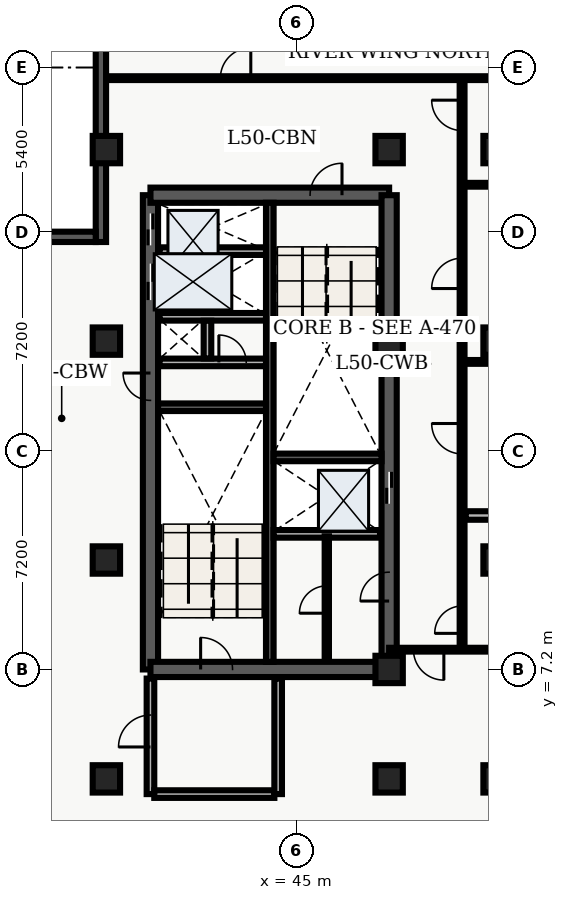
"""IFC4 building model, lengths in metres.
Left out: names, types, materials, properties, quantities, classifications, styles, units other than length and angle.
Written with IfcOpenShell. Run it as: python <this file> out.ifc"""

import sys

from ifc_helpers import new_model, entity, si_unit, converted_unit, direction, frame, origin_with_axes, origin_2d_with_axis, place, context, subcontext, project, spatial, polyline, rectangle, outline, extrude, element, fill, save


model = new_model("IFC4")
c1 = context("Model", 3, precision=1e-05, world=origin_with_axes(), true_north=direction((0.0, 1.0)))
c2 = subcontext(c1, "Body", "Model", "MODEL_VIEW")
j1 = project(units=[si_unit("LENGTHUNIT", "METRE"), converted_unit("PLANEANGLEUNIT", "DEGREE", entity("IfcPlaneAngleMeasure", 0.017), si_unit("PLANEANGLEUNIT", "RADIAN"), dimensions=[0, 0, 0, 0, 0, 0, 0])], contexts=[c1])
p1 = place(None, origin_with_axes())
s1 = spatial("IfcSite", under=j1, at=p1, CompositionType="ELEMENT")
p2 = place(p1, origin_with_axes())
s2 = spatial("IfcBuilding", under=s1, at=p2, CompositionType="ELEMENT")
p3 = place(p2, frame((0.0, 0.0, 204.3), z_axis=(0.0, 0.0, 1.0), x_axis=(1.0, 0.0, 0.0)))
s3 = spatial("IfcBuildingStorey", under=s2, at=p3, CompositionType="ELEMENT", Elevation=204.3)
p4 = place(p3, frame((40.2, 7.2, 0.0), z_axis=(0.0, 0.0, 1.0), x_axis=(0.0, 1.0, 0.0)))
e1 = element("IfcWall", 1, at=p4, inside=s3, PredefinedType="SHEAR", context=c2, shape_type="SweptSolid", body=[
    extrude(outline(polyline([(0.0, -0.25), (15.6, -0.25), (15.6, 0.25), (0.0, 0.25), (0.0, -0.25)])), origin_with_axes(), (0.0, 0.0, 1.0), 3.66),
])
p5 = place(p4, frame((14.475, 0.0, 0.0), z_axis=(0.0, 0.0, 1.0), x_axis=(1.0, 0.0, 0.0)))
e2 = element("IfcOpeningElement", 2, at=p5, cuts=e1, PredefinedType="OPENING", context=c2, shape_type="SweptSolid", body=[
    extrude(rectangle(XDim=1.05, YDim=0.52, at=origin_2d_with_axis()), origin_with_axes(), (0.0, 0.0, 1.0), 2.15),
])
p6 = place(p4, frame((12.75, 0.0, 0.0), z_axis=(0.0, 0.0, 1.0), x_axis=(1.0, 0.0, 0.0)))
e3 = element("IfcOpeningElement", 3, at=p6, cuts=e1, PredefinedType="OPENING", context=c2, shape_type="SweptSolid", body=[
    extrude(rectangle(XDim=1.2, YDim=0.52, at=origin_2d_with_axis()), origin_with_axes(), (0.0, 0.0, 1.0), 2.15),
])
p7 = place(p4, frame((9.3, 0.0, 0.0), z_axis=(0.0, 0.0, 1.0), x_axis=(1.0, 0.0, 0.0)))
e4 = element("IfcOpeningElement", 4, at=p7, cuts=e1, PredefinedType="OPENING", context=c2, shape_type="SweptSolid", body=[
    extrude(rectangle(XDim=0.9, YDim=0.52, at=origin_2d_with_axis()), origin_with_axes(), (0.0, 0.0, 1.0), 2.15),
])
p8 = place(p3, frame((40.2, 7.2, 0.0), z_axis=(0.0, 0.0, 1.0), x_axis=(1.0, 0.0, 0.0)))
e5 = element("IfcWall", 5, at=p8, inside=s3, PredefinedType="SHEAR", context=c2, shape_type="SweptSolid", body=[
    extrude(outline(polyline([(0.0, -0.25), (7.85, -0.25), (7.85, 0.25), (0.0, 0.25), (0.0, -0.25)])), origin_with_axes(), (0.0, 0.0, 1.0), 3.66),
])
p9 = place(p8, frame((2.175, 0.0, 0.0), z_axis=(0.0, 0.0, 1.0), x_axis=(1.0, 0.0, 0.0)))
e6 = element("IfcOpeningElement", 6, at=p9, cuts=e5, PredefinedType="OPENING", context=c2, shape_type="SweptSolid", body=[
    extrude(rectangle(XDim=1.05, YDim=0.52, at=origin_2d_with_axis()), origin_with_axes(), (0.0, 0.0, 1.0), 2.15),
])
p10 = place(p3, frame((40.2, 22.8, 0.0), z_axis=(0.0, 0.0, 1.0), x_axis=(1.0, 0.0, 0.0)))
e7 = element("IfcWall", 7, at=p10, inside=s3, PredefinedType="SHEAR", context=c2, shape_type="SweptSolid", body=[
    extrude(outline(polyline([(0.0, -0.25), (7.85, -0.25), (7.85, 0.25), (0.0, 0.25), (0.0, -0.25)])), origin_with_axes(), (0.0, 0.0, 1.0), 3.66),
])
p11 = place(p10, frame((5.775, 0.0, 0.0), z_axis=(0.0, 0.0, 1.0), x_axis=(1.0, 0.0, 0.0)))
e8 = element("IfcOpeningElement", 8, at=p11, cuts=e7, PredefinedType="OPENING", context=c2, shape_type="SweptSolid", body=[
    extrude(rectangle(XDim=1.05, YDim=0.52, at=origin_2d_with_axis()), origin_with_axes(), (0.0, 0.0, 1.0), 2.15),
])
p12 = place(p3, frame((48.05, 7.2, 0.0), z_axis=(0.0, 0.0, 1.0), x_axis=(0.0, 1.0, 0.0)))
e9 = element("IfcWall", 9, at=p12, inside=s3, PredefinedType="SHEAR", context=c2, shape_type="SweptSolid", body=[
    extrude(outline(polyline([(0.0, -0.25), (15.6, -0.25), (15.6, 0.25), (0.0, 0.25), (0.0, -0.25)])), origin_with_axes(), (0.0, 0.0, 1.0), 3.66),
])
p13 = place(p12, frame((5.975, 0.0, 0.0), z_axis=(0.0, 0.0, 1.0), x_axis=(1.0, 0.0, 0.0)))
e10 = element("IfcOpeningElement", 10, at=p13, cuts=e9, PredefinedType="OPENING", context=c2, shape_type="SweptSolid", body=[
    extrude(rectangle(XDim=1.05, YDim=0.52, at=origin_2d_with_axis()), origin_with_axes(), (0.0, 0.0, 1.0), 2.15),
])
p14 = place(p12, frame((2.725, 0.0, 0.0), z_axis=(0.0, 0.0, 1.0), x_axis=(1.0, 0.0, 0.0)))
e11 = element("IfcOpeningElement", 11, at=p14, cuts=e9, PredefinedType="OPENING", context=c2, shape_type="SweptSolid", body=[
    extrude(rectangle(XDim=0.95, YDim=0.52, at=origin_2d_with_axis()), origin_with_axes(), (0.0, 0.0, 1.0), 2.15),
])
p15 = place(p3, frame((44.125, 7.45, 0.0), z_axis=(0.0, 0.0, 1.0), x_axis=(0.0, 1.0, 0.0)))
e12 = element("IfcWall", 12, at=p15, inside=s3, PredefinedType="SHEAR", context=c2, shape_type="SweptSolid", body=[
    extrude(outline(polyline([(0.0, -0.125), (15.1, -0.125), (15.1, 0.125), (0.0, 0.125), (0.0, -0.125)])), origin_with_axes(), (0.0, 0.0, 1.0), 3.66),
])
for number, where, z_axis, x_axis in (
    (13, (40.45, 15.825, 0.0), (0.0, 0.0, 1.0), (1.0, 0.0, 0.0)),
    (14, (44.25, 14.175, 0.0), (0.0, 0.0, 1.0), (1.0, 0.0, 0.0)),
):
    element("IfcWall", number, at=place(p3, frame(where, z_axis=z_axis, x_axis=x_axis)), inside=s3, PredefinedType="SHEAR", context=c2, shape_type="SweptSolid", body=[
        extrude(outline(polyline([(0.0, -0.125), (3.55, -0.125), (3.55, 0.125), (0.0, 0.125), (0.0, -0.125)])), origin_with_axes(), (0.0, 0.0, 1.0), 3.66),
    ])
p16 = place(p3, frame((40.5, 17.3, 0.0), z_axis=(0.0, 0.0, 1.0), x_axis=(1.0, 0.0, 0.0)))
e15 = element("IfcWall", 15, at=p16, inside=s3, PredefinedType="SOLIDWALL", context=c2, shape_type="SweptSolid", body=[
    extrude(outline(polyline([(0.0, -0.125), (3.5, -0.125), (3.5, 0.125), (0.0, 0.125), (0.0, -0.125)])), origin_with_axes(), (0.0, 0.0, 1.0), 2.7),
])
p17 = place(p16, frame((2.4, 0.0, 0.0), z_axis=(0.0, 0.0, 1.0), x_axis=(1.0, 0.0, 0.0)))
e16 = element("IfcOpeningElement", 16, at=p17, cuts=e15, PredefinedType="OPENING", context=c2, shape_type="SweptSolid", body=[
    extrude(rectangle(XDim=0.9, YDim=0.27, at=origin_2d_with_axis()), origin_with_axes(), (0.0, 0.0, 1.0), 2.15),
])
p18 = place(p3, frame((40.5, 18.8, 0.0), z_axis=(0.0, 0.0, 1.0), x_axis=(1.0, 0.0, 0.0)))
e17 = element("IfcWall", 17, at=p18, inside=s3, PredefinedType="SOLIDWALL", context=c2, shape_type="SweptSolid", body=[
    extrude(outline(polyline([(0.0, -0.125), (3.5, -0.125), (3.5, 0.125), (0.0, 0.125), (0.0, -0.125)])), origin_with_axes(), (0.0, 0.0, 1.0), 2.7),
])
p19 = place(p3, frame((42.075, 17.43, 0.0), z_axis=(0.0, 0.0, 1.0), x_axis=(0.0, 1.0, 0.0)))
e18 = element("IfcWall", 18, at=p19, inside=s3, PredefinedType="SOLIDWALL", context=c2, shape_type="SweptSolid", body=[
    extrude(outline(polyline([(0.0, -0.125), (1.24, -0.125), (1.24, 0.125), (0.0, 0.125), (0.0, -0.125)])), origin_with_axes(), (0.0, 0.0, 1.0), 2.7),
])
p20 = place(p3, frame((40.2, 3.1, 0.0), z_axis=(0.0, 0.0, 1.0), x_axis=(0.0, 1.0, 0.0)))
e19 = element("IfcWall", 19, at=p20, inside=s3, PredefinedType="SOLIDWALL", context=c2, shape_type="SweptSolid", body=[
    extrude(outline(polyline([(0.0, -0.125), (3.8, -0.125), (3.8, 0.125), (0.0, 0.125), (0.0, -0.125)])), origin_with_axes(), (0.0, 0.0, 1.0), 2.7),
])
p21 = place(p20, frame((2.075, 0.0, 0.0), z_axis=(0.0, 0.0, 1.0), x_axis=(1.0, 0.0, 0.0)))
e20 = element("IfcOpeningElement", 20, at=p21, cuts=e19, PredefinedType="OPENING", context=c2, shape_type="SweptSolid", body=[
    extrude(rectangle(XDim=1.05, YDim=0.27, at=origin_2d_with_axis()), origin_with_axes(), (0.0, 0.0, 1.0), 2.15),
])
p22 = place(p3, frame((40.325, 3.1, 0.0), z_axis=(0.0, 0.0, 1.0), x_axis=(1.0, 0.0, 0.0)))
e21 = element("IfcWall", 21, at=p22, inside=s3, PredefinedType="SOLIDWALL", context=c2, shape_type="SweptSolid", body=[
    extrude(outline(polyline([(0.0, -0.125), (3.95, -0.125), (3.95, 0.125), (0.0, 0.125), (0.0, -0.125)])), origin_with_axes(), (0.0, 0.0, 1.0), 2.7),
])
p23 = place(p3, frame((44.4, 3.1, 0.0), z_axis=(0.0, 0.0, 1.0), x_axis=(0.0, 1.0, 0.0)))
e22 = element("IfcWall", 22, at=p23, inside=s3, PredefinedType="SOLIDWALL", context=c2, shape_type="SweptSolid", body=[
    extrude(outline(polyline([(0.0, -0.125), (3.8, -0.125), (3.8, 0.125), (0.0, 0.125), (0.0, -0.125)])), origin_with_axes(), (0.0, 0.0, 1.0), 2.7),
])
for number, where, z_axis, x_axis in (
    (23, (38.75, 3.6, 0.0), (0.0, 0.0, 1.0), (1.0, 0.0, 0.0)),
    (24, (38.75, 10.8, 0.0), (0.0, 0.0, 1.0), (1.0, 0.0, 0.0)),
    (25, (38.75, 18.0, 0.0), (0.0, 0.0, 1.0), (1.0, 0.0, 0.0)),
    (26, (38.75, 24.3, 0.0), (0.0, 0.0, 1.0), (1.0, 0.0, 0.0)),
    (27, (48.05, 3.6, 0.0), (0.0, 0.0, 1.0), (1.0, 0.0, 0.0)),
    (28, (48.05, 7.2, 0.0), (0.0, 0.0, 1.0), (1.0, 0.0, 0.0)),
    (29, (48.05, 18.0, 0.0), (0.0, 0.0, 1.0), (1.0, 0.0, 0.0)),
    (30, (48.05, 24.3, 0.0), (0.0, 0.0, 1.0), (1.0, 0.0, 0.0)),
    (31, (51.6, 3.6, 0.0), (0.0, 0.0, 1.0), (1.0, 0.0, 0.0)),
    (32, (51.6, 10.8, 0.0), (0.0, 0.0, 1.0), (1.0, 0.0, 0.0)),
    (33, (51.6, 18.0, 0.0), (0.0, 0.0, 1.0), (1.0, 0.0, 0.0)),
    (34, (51.6, 24.3, 0.0), (0.0, 0.0, 1.0), (1.0, 0.0, 0.0)),
):
    element("IfcColumn", number, at=place(p3, frame(where, z_axis=z_axis, x_axis=x_axis)), inside=s3, PredefinedType="COLUMN", context=c2, shape_type="SweptSolid", body=[
        extrude(rectangle(XDim=0.9, YDim=0.9, at=origin_2d_with_axis()), origin_with_axes(), (0.0, 0.0, 1.0), 3.9),
    ])
for number, where, z_axis, x_axis in (
    (35, (40.5, 20.96, 0.0), (0.0, 0.0, 1.0), (1.0, 0.0, 0.0)),
    (36, (44.25, 11.66, 0.0), (0.0, 0.0, 1.0), (1.0, 0.0, 0.0)),
):
    element("IfcWall", number, at=place(p3, frame(where, z_axis=z_axis, x_axis=x_axis)), inside=s3, PredefinedType="SOLIDWALL", context=c2, shape_type="SweptSolid", body=[
        extrude(outline(polyline([(0.0, -0.125), (3.5, -0.125), (3.5, 0.125), (0.0, 0.125), (0.0, -0.125)])), origin_with_axes(), (0.0, 0.0, 1.0), 2.7),
    ])
p24 = place(p3, frame((46.0, 7.5, 0.0), z_axis=(0.0, 0.0, 1.0), x_axis=(0.0, 1.0, 0.0)))
e37 = element("IfcWall", 37, at=p24, inside=s3, PredefinedType="PARTITIONING", context=c2, shape_type="SweptSolid", body=[
    extrude(outline(polyline([(0.0, -0.07), (4.08, -0.07), (4.08, 0.07), (0.0, 0.07), (0.0, -0.07)])), origin_with_axes(), (0.0, 0.0, 1.0), 2.7),
])
p25 = place(p24, frame((2.0, 0.0, 0.0), z_axis=(0.0, 0.0, 1.0), x_axis=(1.0, 0.0, 0.0)))
e38 = element("IfcOpeningElement", 38, at=p25, cuts=e37, PredefinedType="OPENING", context=c2, shape_type="SweptSolid", body=[
    extrude(rectangle(XDim=0.9, YDim=0.16, at=origin_2d_with_axis()), origin_with_axes(), (0.0, 0.0, 1.0), 2.15),
])
p26 = place(p3, frame((50.45, 7.85, 0.0), z_axis=(0.0, 0.0, 1.0), x_axis=(0.0, 1.0, 0.0)))
e39 = element("IfcWall", 39, at=p26, inside=s3, PredefinedType="PARTITIONING", context=c2, shape_type="SweptSolid", body=[
    extrude(outline(polyline([(0.0, -0.08), (18.8, -0.08), (18.8, 0.08), (0.0, 0.08), (0.0, -0.08)])), origin_with_axes(), (0.0, 0.0, 1.0), 2.7),
])
p27 = place(p26, frame((0.987, 0.0, 0.0), z_axis=(0.0, 0.0, 1.0), x_axis=(1.0, 0.0, 0.0)))
e40 = element("IfcOpeningElement", 40, at=p27, cuts=e39, PredefinedType="OPENING", context=c2, shape_type="SweptSolid", body=[
    extrude(rectangle(XDim=0.9, YDim=0.18, at=origin_2d_with_axis()), origin_with_axes(), (0.0, 0.0, 1.0), 2.15),
])
p28 = place(p26, frame((6.94, 0.0, 0.0), z_axis=(0.0, 0.0, 1.0), x_axis=(1.0, 0.0, 0.0)))
e41 = element("IfcOpeningElement", 41, at=p28, cuts=e39, PredefinedType="OPENING", context=c2, shape_type="SweptSolid", body=[
    extrude(rectangle(XDim=1.0, YDim=0.18, at=origin_2d_with_axis()), origin_with_axes(), (0.0, 0.0, 1.0), 2.15),
])
p29 = place(p26, frame((12.38, 0.0, 0.0), z_axis=(0.0, 0.0, 1.0), x_axis=(1.0, 0.0, 0.0)))
e42 = element("IfcOpeningElement", 42, at=p29, cuts=e39, PredefinedType="OPENING", context=c2, shape_type="SweptSolid", body=[
    extrude(rectangle(XDim=1.0, YDim=0.18, at=origin_2d_with_axis()), origin_with_axes(), (0.0, 0.0, 1.0), 2.15),
])
p30 = place(p26, frame((17.576, 0.0, 0.0), z_axis=(0.0, 0.0, 1.0), x_axis=(1.0, 0.0, 0.0)))
e43 = element("IfcOpeningElement", 43, at=p30, cuts=e39, PredefinedType="OPENING", context=c2, shape_type="SweptSolid", body=[
    extrude(rectangle(XDim=1.0, YDim=0.18, at=origin_2d_with_axis()), origin_with_axes(), (0.0, 0.0, 1.0), 2.15),
])
p31 = place(p3, frame((59.665, 7.85, 0.0), z_axis=(0.0, 0.0, 1.0), x_axis=(-1.0, 0.0, 0.0)))
e44 = element("IfcWall", 44, at=p31, inside=s3, PredefinedType="PARTITIONING", context=c2, shape_type="SweptSolid", body=[
    extrude(outline(polyline([(0.0, -0.062), (11.615, -0.062), (11.615, 0.062), (0.0, 0.062), (0.0, -0.062)])), origin_with_axes(), (0.0, 0.0, 1.0), 2.7),
])
p32 = place(p31, frame((10.315, 0.0, 0.0), z_axis=(0.0, 0.0, 1.0), x_axis=(1.0, 0.0, 0.0)))
e45 = element("IfcOpeningElement", 45, at=p32, cuts=e44, PredefinedType="OPENING", context=c2, shape_type="SweptSolid", body=[
    extrude(rectangle(XDim=1.0, YDim=0.145, at=origin_2d_with_axis()), origin_with_axes(), (0.0, 0.0, 1.0), 2.15),
])
p33 = place(p3, frame((38.735, 26.65, 0.0), z_axis=(0.0, 0.0, 1.0), x_axis=(1.0, 0.0, 0.0)))
e46 = element("IfcWall", 46, at=p33, inside=s3, PredefinedType="PARTITIONING", context=c2, shape_type="SweptSolid", body=[
    extrude(outline(polyline([(0.0, -0.062), (20.905, -0.062), (20.905, 0.062), (0.0, 0.062), (0.0, -0.062)])), origin_with_axes(), (0.0, 0.0, 1.0), 2.7),
])
p34 = place(p33, frame((4.265, 0.0, 0.0), z_axis=(0.0, 0.0, 1.0), x_axis=(1.0, 0.0, 0.0)))
e47 = element("IfcOpeningElement", 47, at=p34, cuts=e46, PredefinedType="OPENING", context=c2, shape_type="SweptSolid", body=[
    extrude(rectangle(XDim=1.0, YDim=0.145, at=origin_2d_with_axis()), origin_with_axes(), (0.0, 0.0, 1.0), 2.15),
])
p35 = place(p3, frame((50.57, 12.264, 0.0), z_axis=(0.0, 0.0, 1.0), x_axis=(1.0, 0.0, 0.0)))
e48 = element("IfcWall", 48, at=p35, inside=s3, PredefinedType="PARTITIONING", context=c2, shape_type="SweptSolid", body=[
    extrude(outline(polyline([(0.0, -0.14), (9.095, -0.14), (9.095, 0.14), (0.0, 0.14), (0.0, -0.14)])), origin_with_axes(), (0.0, 0.0, 1.0), 2.7),
])
for number, where, z_axis, x_axis in (
    (49, (50.57, 17.316, 0.0), (0.0, 0.0, 1.0), (1.0, 0.0, 0.0)),
    (50, (50.57, 23.143, 0.0), (0.0, 0.0, 1.0), (1.0, 0.0, 0.0)),
):
    element("IfcWall", number, at=place(p3, frame(where, z_axis=z_axis, x_axis=x_axis)), inside=s3, PredefinedType="PARTITIONING", context=c2, shape_type="SweptSolid", body=[
        extrude(outline(polyline([(0.0, -0.062), (9.095, -0.062), (9.095, 0.062), (0.0, 0.062), (0.0, -0.062)])), origin_with_axes(), (0.0, 0.0, 1.0), 2.7),
    ])
p36 = place(p3, frame((38.57, 21.26, 0.0), z_axis=(0.0, 0.0, 1.0), x_axis=(0.0, 1.0, 0.0)))
e51 = element("IfcWall", 51, at=p36, inside=s3, PredefinedType="SOLIDWALL", context=c2, shape_type="SweptSolid", body=[
    extrude(outline(polyline([(0.0, -0.17), (7.54, -0.17), (7.54, 0.17), (0.0, 0.17), (0.0, -0.17)])), origin_with_axes(), (0.0, 0.0, 1.0), 3.66),
])
p37 = place(p3, frame((29.541, 21.43, 0.0), z_axis=(0.0, 0.0, 1.0), x_axis=(1.0, 0.0, 0.0)))
e52 = element("IfcWall", 52, at=p37, inside=s3, PredefinedType="SOLIDWALL", context=c2, shape_type="SweptSolid", body=[
    extrude(outline(polyline([(0.0, -0.17), (8.859, -0.17), (8.859, 0.17), (0.0, 0.17), (0.0, -0.17)])), origin_with_axes(), (0.0, 0.0, 1.0), 3.66),
])
p38 = place(p37, frame((4.429, 0.0, 0.45), z_axis=(0.0, 0.0, 1.0), x_axis=(1.0, 0.0, 0.0)))
e53 = element("IfcOpeningElement", 53, at=p38, cuts=e52, PredefinedType="OPENING", context=c2, shape_type="SweptSolid", body=[
    extrude(rectangle(XDim=1.8, YDim=0.36, at=origin_2d_with_axis()), origin_with_axes(), (0.0, 0.0, 1.0), 2.1),
])
p39 = place(p12, frame((5.975, 0.0, 0.0), z_axis=(0.0, 0.0, 1.0), x_axis=(1.0, 0.0, 0.0)))
e54 = element("IfcDoor", 54, at=p39, inside=s3, OperationType="SLIDING_TO_LEFT", PredefinedType="DOOR", context=c2, shape_type="SweptSolid", body=[
    extrude(rectangle(XDim=1.05, YDim=0.09, at=origin_2d_with_axis()), origin_with_axes(), (0.0, 0.0, 1.0), 2.15),
])
fill(e10, e54)
p40 = place(p4, frame((14.475, 0.0, 0.0), z_axis=(0.0, 0.0, 1.0), x_axis=(1.0, 0.0, 0.0)))
e55 = element("IfcDoor", 55, at=p40, inside=s3, OperationType="SLIDING_TO_RIGHT", PredefinedType="DOOR", context=c2, shape_type="SweptSolid", body=[
    extrude(rectangle(XDim=1.05, YDim=0.09, at=origin_2d_with_axis()), origin_with_axes(), (0.0, 0.0, 1.0), 2.15),
])
fill(e2, e55)
p41 = place(p4, frame((12.75, 0.0, 0.0), z_axis=(0.0, 0.0, 1.0), x_axis=(1.0, 0.0, 0.0)))
e56 = element("IfcDoor", 56, at=p41, inside=s3, OperationType="DOUBLE_DOOR_SLIDING", PredefinedType="DOOR", context=c2, shape_type="SweptSolid", body=[
    extrude(rectangle(XDim=1.2, YDim=0.09, at=origin_2d_with_axis()), origin_with_axes(), (0.0, 0.0, 1.0), 2.15),
])
fill(e3, e56)
p42 = place(p4, frame((9.3, 0.0, 0.0), z_axis=(0.0, 0.0, 1.0), x_axis=(1.0, 0.0, 0.0)))
e57 = element("IfcDoor", 57, at=p42, inside=s3, OperationType="SINGLE_SWING_RIGHT", PredefinedType="DOOR", context=c2, shape_type="SweptSolid", body=[
    extrude(rectangle(XDim=0.9, YDim=0.09, at=origin_2d_with_axis()), origin_with_axes(), (0.0, 0.0, 1.0), 2.15),
])
fill(e4, e57)
p43 = place(p16, frame((2.4, 0.0, 0.0), z_axis=(0.0, 0.0, 1.0), x_axis=(1.0, 0.0, 0.0)))
e58 = element("IfcDoor", 58, at=p43, inside=s3, OperationType="SINGLE_SWING_LEFT", PredefinedType="DOOR", context=c2, shape_type="SweptSolid", body=[
    extrude(rectangle(XDim=0.9, YDim=0.09, at=origin_2d_with_axis()), origin_with_axes(), (0.0, 0.0, 1.0), 2.15),
])
fill(e16, e58)
p44 = place(p8, frame((2.175, 0.0, 0.0), z_axis=(0.0, 0.0, 1.0), x_axis=(1.0, 0.0, 0.0)))
e59 = element("IfcDoor", 59, at=p44, inside=s3, OperationType="SINGLE_SWING_LEFT", PredefinedType="DOOR", context=c2, shape_type="SweptSolid", body=[
    extrude(rectangle(XDim=1.05, YDim=0.09, at=origin_2d_with_axis()), origin_with_axes(), (0.0, 0.0, 1.0), 2.15),
])
fill(e6, e59)
p45 = place(p10, frame((5.775, 0.0, 0.0), z_axis=(0.0, 0.0, 1.0), x_axis=(1.0, 0.0, 0.0)))
e60 = element("IfcDoor", 60, at=p45, inside=s3, OperationType="SINGLE_SWING_RIGHT", PredefinedType="DOOR", context=c2, shape_type="SweptSolid", body=[
    extrude(rectangle(XDim=1.05, YDim=0.09, at=origin_2d_with_axis()), origin_with_axes(), (0.0, 0.0, 1.0), 2.15),
])
fill(e8, e60)
p46 = place(p20, frame((2.075, 0.0, 0.0), z_axis=(0.0, 0.0, 1.0), x_axis=(1.0, 0.0, 0.0)))
e61 = element("IfcDoor", 61, at=p46, inside=s3, OperationType="SINGLE_SWING_LEFT", PredefinedType="DOOR", context=c2, shape_type="SweptSolid", body=[
    extrude(rectangle(XDim=1.05, YDim=0.09, at=origin_2d_with_axis()), origin_with_axes(), (0.0, 0.0, 1.0), 2.15),
])
fill(e20, e61)
p47 = place(p24, frame((2.0, 0.0, 0.0), z_axis=(0.0, 0.0, 1.0), x_axis=(1.0, 0.0, 0.0)))
e62 = element("IfcDoor", 62, at=p47, inside=s3, OperationType="SINGLE_SWING_LEFT", PredefinedType="DOOR", context=c2, shape_type="SweptSolid", body=[
    extrude(rectangle(XDim=0.9, YDim=0.084, at=origin_2d_with_axis()), origin_with_axes(), (0.0, 0.0, 1.0), 2.15),
])
fill(e38, e62)
p48 = place(p12, frame((2.725, 0.0, 0.0), z_axis=(0.0, 0.0, 1.0), x_axis=(1.0, 0.0, 0.0)))
e63 = element("IfcDoor", 63, at=p48, inside=s3, OperationType="SINGLE_SWING_LEFT", PredefinedType="DOOR", context=c2, shape_type="SweptSolid", body=[
    extrude(rectangle(XDim=0.95, YDim=0.09, at=origin_2d_with_axis()), origin_with_axes(), (0.0, 0.0, 1.0), 2.15),
])
fill(e11, e63)
p49 = place(p31, frame((10.315, 0.0, 0.0), z_axis=(0.0, 0.0, 1.0), x_axis=(1.0, 0.0, 0.0)))
e64 = element("IfcDoor", 64, at=p49, inside=s3, OperationType="SINGLE_SWING_LEFT", PredefinedType="DOOR", context=c2, shape_type="SweptSolid", body=[
    extrude(rectangle(XDim=1.0, YDim=0.075, at=origin_2d_with_axis()), origin_with_axes(), (0.0, 0.0, 1.0), 2.15),
])
fill(e45, e64)
p50 = place(p33, frame((4.265, 0.0, 0.0), z_axis=(0.0, 0.0, 1.0), x_axis=(1.0, 0.0, 0.0)))
e65 = element("IfcDoor", 65, at=p50, inside=s3, OperationType="SINGLE_SWING_RIGHT", PredefinedType="DOOR", context=c2, shape_type="SweptSolid", body=[
    extrude(rectangle(XDim=1.0, YDim=0.075, at=origin_2d_with_axis()), origin_with_axes(), (0.0, 0.0, 1.0), 2.15),
])
fill(e47, e65)
p51 = place(p26, frame((0.987, 0.0, 0.0), z_axis=(0.0, 0.0, 1.0), x_axis=(1.0, 0.0, 0.0)))
e66 = element("IfcDoor", 66, at=p51, inside=s3, OperationType="SINGLE_SWING_LEFT", PredefinedType="DOOR", context=c2, shape_type="SweptSolid", body=[
    extrude(rectangle(XDim=0.9, YDim=0.09, at=origin_2d_with_axis()), origin_with_axes(), (0.0, 0.0, 1.0), 2.15),
])
fill(e40, e66)
p52 = place(p26, frame((6.94, 0.0, 0.0), z_axis=(0.0, 0.0, 1.0), x_axis=(1.0, 0.0, 0.0)))
e67 = element("IfcDoor", 67, at=p52, inside=s3, OperationType="SINGLE_SWING_RIGHT", PredefinedType="DOOR", context=c2, shape_type="SweptSolid", body=[
    extrude(rectangle(XDim=1.0, YDim=0.09, at=origin_2d_with_axis()), origin_with_axes(), (0.0, 0.0, 1.0), 2.15),
])
fill(e41, e67)
p53 = place(p26, frame((12.38, 0.0, 0.0), z_axis=(0.0, 0.0, 1.0), x_axis=(1.0, 0.0, 0.0)))
e68 = element("IfcDoor", 68, at=p53, inside=s3, OperationType="SINGLE_SWING_LEFT", PredefinedType="DOOR", context=c2, shape_type="SweptSolid", body=[
    extrude(rectangle(XDim=1.0, YDim=0.09, at=origin_2d_with_axis()), origin_with_axes(), (0.0, 0.0, 1.0), 2.15),
])
fill(e42, e68)
p54 = place(p26, frame((17.576, 0.0, 0.0), z_axis=(0.0, 0.0, 1.0), x_axis=(1.0, 0.0, 0.0)))
e69 = element("IfcDoor", 69, at=p54, inside=s3, OperationType="SINGLE_SWING_RIGHT", PredefinedType="DOOR", context=c2, shape_type="SweptSolid", body=[
    extrude(rectangle(XDim=1.0, YDim=0.09, at=origin_2d_with_axis()), origin_with_axes(), (0.0, 0.0, 1.0), 2.15),
])
fill(e43, e69)
save(model, sys.argv[1])
